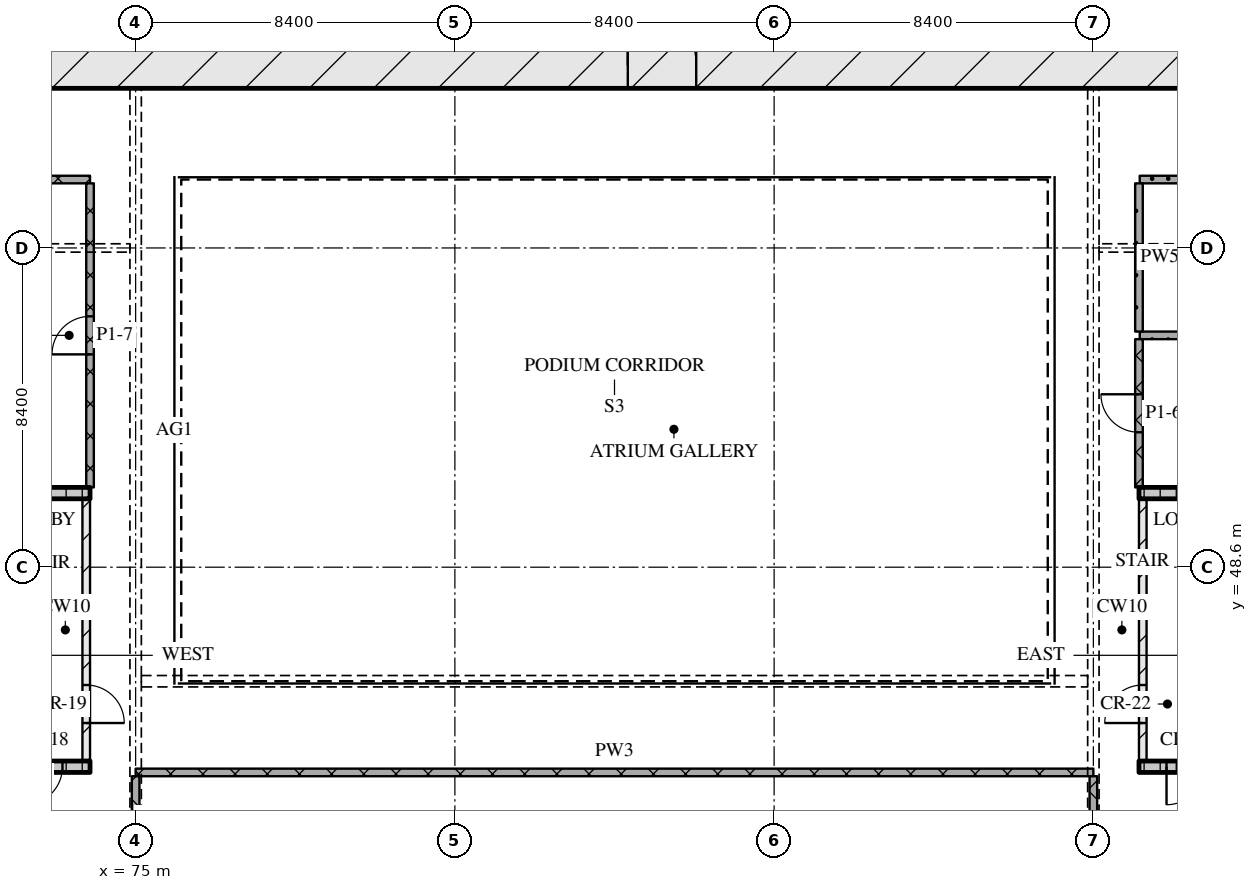
"""IFC4 building model, lengths in metres.
Left out: names, types, materials, properties, quantities, classifications, styles, units other than length and angle.
Written with IfcOpenShell. Run it as: python <this file> out.ifc"""

import sys

from ifc_helpers import new_model, si_unit, direction, frame, frame_2d, origin, place, context, subcontext, project, spatial, rectangle, extrude, element, fill, save


model = new_model("IFC4")
c1 = context("Model", 3, precision=1e-05, world=origin(), true_north=direction((0.0, 1.0)))
c2 = subcontext(c1, "Body", "Model", "MODEL_VIEW")
j1 = project(units=[si_unit("LENGTHUNIT", "METRE"), si_unit("PLANEANGLEUNIT", "RADIAN")], contexts=[c1])
p1 = place(None, origin())
s1 = spatial("IfcSite", under=j1, at=p1, CompositionType="ELEMENT")
p2 = place(p1, origin())
s2 = spatial("IfcBuilding", under=s1, at=p2, CompositionType="ELEMENT")
p3 = place(p2, frame((0.0, 0.0, 9.0)))
s3 = spatial("IfcBuildingStorey", under=s2, at=p3, CompositionType="ELEMENT", Elevation=9.0)
p4 = place(p3, frame((66.6, 61.8, 0.0), z_axis=(0.0, 0.0, 1.0), x_axis=(1.0, 0.0, 0.0)))
e1 = element("IfcWall", 1, at=p4, inside=s3, PredefinedType="SOLIDWALL", context=c2, shape_type="SweptSolid", body=[
    extrude(rectangle(XDim=42.0, YDim=1.2, at=frame_2d((21.0, 0.0))), origin(), (0.0, 0.0, 1.0), 5.1),
])
p5 = place(p4, frame((21.35, 0.0, 0.0)))
e2 = element("IfcOpeningElement", 2, at=p5, cuts=e1, PredefinedType="OPENING", context=c2, shape_type="SweptSolid", body=[
    extrude(rectangle(XDim=1.8, YDim=2.1, at=frame_2d((0.9, 1.05))), frame((0.0, 0.61, 0.0), z_axis=(0.0, -1.0, 0.0), x_axis=(1.0, 0.0, 0.0)), (0.0, 0.0, 1.0), 1.22),
])
p6 = place(p3, frame((68.2, 43.35, 0.0), z_axis=(0.0, 0.0, 1.0), x_axis=(1.0, 0.0, 0.0)))
e3 = element("IfcWall", 3, at=p6, inside=s3, PredefinedType="SOLIDWALL", context=c2, shape_type="SweptSolid", body=[
    extrude(rectangle(XDim=5.6, YDim=0.3, at=frame_2d((2.8, 0.0))), origin(), (0.0, 0.0, 1.0), 5.1),
])
p7 = place(p6, frame((3.875, 0.0, 0.0)))
e4 = element("IfcOpeningElement", 4, at=p7, cuts=e3, PredefinedType="OPENING", context=c2, shape_type="SweptSolid", body=[
    extrude(rectangle(XDim=1.0, YDim=2.1, at=frame_2d((0.5, 1.05))), frame((0.0, 0.16, 0.0), z_axis=(0.0, -1.0, 0.0), x_axis=(1.0, 0.0, 0.0)), (0.0, 0.0, 1.0), 0.32),
])
p8 = place(p3, frame((73.7, 43.5, 0.0), z_axis=(0.0, 0.0, 1.0), x_axis=(0.0, 1.0, 0.0)))
e5 = element("IfcWall", 5, at=p8, inside=s3, PredefinedType="PARTITIONING", context=c2, shape_type="SweptSolid", body=[
    extrude(rectangle(XDim=6.9, YDim=0.2, at=frame_2d((3.45, 0.0))), origin(), (0.0, 0.0, 1.0), 5.1),
])
p9 = place(p8, frame((1.0, 0.0, 0.0)))
e6 = element("IfcOpeningElement", 6, at=p9, cuts=e5, PredefinedType="OPENING", context=c2, shape_type="SweptSolid", body=[
    extrude(rectangle(XDim=1.0, YDim=2.1, at=frame_2d((0.5, 1.05))), frame((0.0, 0.11, 0.0), z_axis=(0.0, -1.0, 0.0), x_axis=(1.0, 0.0, 0.0)), (0.0, 0.0, 1.0), 0.22),
])
p10 = place(p3, frame((68.2, 50.55, 0.0), z_axis=(0.0, 0.0, 1.0), x_axis=(1.0, 0.0, 0.0)))
e7 = element("IfcWall", 7, at=p10, inside=s3, PredefinedType="SOLIDWALL", context=c2, shape_type="SweptSolid", body=[
    extrude(rectangle(XDim=5.6, YDim=0.3, at=frame_2d((2.8, 0.0))), origin(), (0.0, 0.0, 1.0), 5.1),
])
p11 = place(p3, frame((101.4, 43.35, 0.0), z_axis=(0.0, 0.0, 1.0), x_axis=(1.0, 0.0, 0.0)))
e8 = element("IfcWall", 8, at=p11, inside=s3, PredefinedType="SOLIDWALL", context=c2, shape_type="SweptSolid", body=[
    extrude(rectangle(XDim=5.6, YDim=0.3, at=frame_2d((2.8, 0.0))), origin(), (0.0, 0.0, 1.0), 5.1),
])
p12 = place(p11, frame((0.725, 0.0, 0.0)))
e9 = element("IfcOpeningElement", 9, at=p12, cuts=e8, PredefinedType="OPENING", context=c2, shape_type="SweptSolid", body=[
    extrude(rectangle(XDim=1.0, YDim=2.1, at=frame_2d((0.5, 1.05))), frame((0.0, 0.16, 0.0), z_axis=(0.0, -1.0, 0.0), x_axis=(1.0, 0.0, 0.0)), (0.0, 0.0, 1.0), 0.32),
])
p13 = place(p3, frame((101.5, 43.5, 0.0), z_axis=(0.0, 0.0, 1.0), x_axis=(0.0, 1.0, 0.0)))
e10 = element("IfcWall", 10, at=p13, inside=s3, PredefinedType="PARTITIONING", context=c2, shape_type="SweptSolid", body=[
    extrude(rectangle(XDim=6.9, YDim=0.2, at=frame_2d((3.45, 0.0))), origin(), (0.0, 0.0, 1.0), 5.1),
])
p14 = place(p13, frame((1.0, 0.0, 0.0)))
e11 = element("IfcOpeningElement", 11, at=p14, cuts=e10, PredefinedType="OPENING", context=c2, shape_type="SweptSolid", body=[
    extrude(rectangle(XDim=1.0, YDim=2.1, at=frame_2d((0.5, 1.05))), frame((0.0, 0.11, 0.0), z_axis=(0.0, -1.0, 0.0), x_axis=(1.0, 0.0, 0.0)), (0.0, 0.0, 1.0), 0.22),
])
p15 = place(p3, frame((101.4, 50.55, 0.0), z_axis=(0.0, 0.0, 1.0), x_axis=(1.0, 0.0, 0.0)))
e12 = element("IfcWall", 12, at=p15, inside=s3, PredefinedType="SOLIDWALL", context=c2, shape_type="SweptSolid", body=[
    extrude(rectangle(XDim=5.6, YDim=0.3, at=frame_2d((2.8, 0.0))), origin(), (0.0, 0.0, 1.0), 5.1),
])
p16 = place(p3, frame((75.0, 43.2, 0.0), z_axis=(0.0, 0.0, 1.0), x_axis=(1.0, 0.0, 0.0)))
e13 = element("IfcWall", 13, at=p16, inside=s3, PredefinedType="PARTITIONING", context=c2, shape_type="SweptSolid", body=[
    extrude(rectangle(XDim=25.2, YDim=0.2, at=frame_2d((12.6, 0.0))), origin(), (0.0, 0.0, 1.0), 5.1),
])
p17 = place(p3, frame((101.42, 54.7, 0.0), z_axis=(0.0, 0.0, 1.0), x_axis=(1.0, 0.0, 0.0)))
e14 = element("IfcWall", 14, at=p17, inside=s3, PredefinedType="PARTITIONING", context=c2, shape_type="SweptSolid", body=[
    extrude(rectangle(XDim=5.96, YDim=0.2, at=frame_2d((2.98, 0.0))), origin(), (0.0, 0.0, 1.0), 5.1),
])
p18 = place(p3, frame((73.8, 58.8, 0.0), z_axis=(0.0, 0.0, 1.0), x_axis=(-1.0, 0.0, 0.0)))
e15 = element("IfcWall", 15, at=p18, inside=s3, PredefinedType="PARTITIONING", context=c2, shape_type="SweptSolid", body=[
    extrude(rectangle(XDim=38.4, YDim=0.2, at=frame_2d((19.2, 0.0))), origin(), (0.0, 0.0, 1.0), 5.1),
])
p19 = place(p18, frame((21.6, 0.0, 0.0)))
e16 = element("IfcOpeningElement", 16, at=p19, cuts=e15, PredefinedType="OPENING", context=c2, shape_type="SweptSolid", body=[
    extrude(rectangle(XDim=1.2, YDim=2.1, at=frame_2d((0.6, 1.05))), frame((0.0, 0.11, 0.0), z_axis=(0.0, -1.0, 0.0), x_axis=(1.0, 0.0, 0.0)), (0.0, 0.0, 1.0), 0.22),
])
p20 = place(p3, frame((101.42, 58.8, 0.0), z_axis=(0.0, 0.0, 1.0), x_axis=(1.0, 0.0, 0.0)))
e17 = element("IfcWall", 17, at=p20, inside=s3, PredefinedType="PARTITIONING", context=c2, shape_type="SweptSolid", body=[
    extrude(rectangle(XDim=5.96, YDim=0.2, at=frame_2d((2.98, 0.0))), origin(), (0.0, 0.0, 1.0), 5.1),
])
p21 = place(p3, frame((73.8, 50.7, 0.0), z_axis=(0.0, 0.0, 1.0), x_axis=(0.0, 1.0, 0.0)))
e18 = element("IfcWall", 18, at=p21, inside=s3, PredefinedType="PARTITIONING", context=c2, shape_type="SweptSolid", body=[
    extrude(rectangle(XDim=8.0, YDim=0.2, at=frame_2d((4.0, 0.0))), origin(), (0.0, 0.0, 1.0), 5.1),
])
p22 = place(p21, frame((3.5, 0.0, 0.0)))
e19 = element("IfcOpeningElement", 19, at=p22, cuts=e18, PredefinedType="OPENING", context=c2, shape_type="SweptSolid", body=[
    extrude(rectangle(XDim=1.0, YDim=2.1, at=frame_2d((0.5, 1.05))), frame((0.0, 0.11, 0.0), z_axis=(0.0, -1.0, 0.0), x_axis=(1.0, 0.0, 0.0)), (0.0, 0.0, 1.0), 0.22),
])
for number, where, z_axis, x_axis in (
    (20, (75.0, 43.1, 0.0), (0.0, 0.0, 1.0), (0.0, -1.0, 0.0)),
    (21, (100.2, 43.1, 0.0), (0.0, 0.0, 1.0), (0.0, -1.0, 0.0)),
):
    element("IfcWall", number, at=place(p3, frame(where, z_axis=z_axis, x_axis=x_axis)), inside=s3, PredefinedType="PARTITIONING", context=c2, shape_type="SweptSolid", body=[
        extrude(rectangle(XDim=2.2, YDim=0.2, at=frame_2d((1.1, 0.0))), origin(), (0.0, 0.0, 1.0), 4.2),
    ])
p23 = place(p3, frame((101.4, 54.6, 0.0), z_axis=(0.0, 0.0, 1.0), x_axis=(0.0, -1.0, 0.0)))
e22 = element("IfcWall", 22, at=p23, inside=s3, PredefinedType="PARTITIONING", context=c2, shape_type="SweptSolid", body=[
    extrude(rectangle(XDim=3.9, YDim=0.2, at=frame_2d((1.95, 0.0))), origin(), (0.0, 0.0, 1.0), 5.1),
])
p24 = place(p23, frame((1.45, 0.0, 0.0)))
e23 = element("IfcOpeningElement", 23, at=p24, cuts=e22, PredefinedType="OPENING", context=c2, shape_type="SweptSolid", body=[
    extrude(rectangle(XDim=1.0, YDim=2.1, at=frame_2d((0.5, 1.05))), frame((0.0, 0.11, 0.0), z_axis=(0.0, -1.0, 0.0), x_axis=(1.0, 0.0, 0.0)), (0.0, 0.0, 1.0), 0.22),
])
p25 = place(p3, frame((101.4, 58.7, 0.0), z_axis=(0.0, 0.0, 1.0), x_axis=(0.0, -1.0, 0.0)))
e24 = element("IfcWall", 24, at=p25, inside=s3, PredefinedType="PARTITIONING", context=c2, shape_type="SweptSolid", body=[
    extrude(rectangle(XDim=3.9, YDim=0.2, at=frame_2d((1.95, 0.0))), origin(), (0.0, 0.0, 1.0), 5.1),
])
p26 = place(p5, origin())
e25 = element("IfcDoor", 25, at=p26, inside=s3, OperationType="DOUBLE_DOOR_SINGLE_SWING", PredefinedType="DOOR", context=c2, shape_type="SweptSolid", body=[
    extrude(rectangle(XDim=1.8, YDim=2.1, at=frame_2d((0.9, 1.05))), frame((0.0, 0.025, 0.0), z_axis=(0.0, -1.0, 0.0), x_axis=(1.0, 0.0, 0.0)), (0.0, 0.0, 1.0), 0.05),
])
fill(e2, e25)
p27 = place(p7, origin())
e26 = element("IfcDoor", 26, at=p27, inside=s3, OperationType="SINGLE_SWING_RIGHT", PredefinedType="DOOR", context=c2, shape_type="SweptSolid", body=[
    extrude(rectangle(XDim=1.0, YDim=2.1, at=frame_2d((0.5, 1.05))), frame((0.0, 0.025, 0.0), z_axis=(0.0, -1.0, 0.0), x_axis=(1.0, 0.0, 0.0)), (0.0, 0.0, 1.0), 0.05),
])
fill(e4, e26)
p28 = place(p9, origin())
e27 = element("IfcDoor", 27, at=p28, inside=s3, OperationType="SINGLE_SWING_RIGHT", PredefinedType="DOOR", context=c2, shape_type="SweptSolid", body=[
    extrude(rectangle(XDim=1.0, YDim=2.1, at=frame_2d((0.5, 1.05))), frame((0.0, 0.025, 0.0), z_axis=(0.0, -1.0, 0.0), x_axis=(1.0, 0.0, 0.0)), (0.0, 0.0, 1.0), 0.05),
])
fill(e6, e27)
p29 = place(p12, origin())
e28 = element("IfcDoor", 28, at=p29, inside=s3, OperationType="SINGLE_SWING_RIGHT", PredefinedType="DOOR", context=c2, shape_type="SweptSolid", body=[
    extrude(rectangle(XDim=1.0, YDim=2.1, at=frame_2d((0.5, 1.05))), frame((0.0, 0.025, 0.0), z_axis=(0.0, -1.0, 0.0), x_axis=(1.0, 0.0, 0.0)), (0.0, 0.0, 1.0), 0.05),
])
fill(e9, e28)
p30 = place(p14, origin())
e29 = element("IfcDoor", 29, at=p30, inside=s3, OperationType="SINGLE_SWING_LEFT", PredefinedType="DOOR", context=c2, shape_type="SweptSolid", body=[
    extrude(rectangle(XDim=1.0, YDim=2.1, at=frame_2d((0.5, 1.05))), frame((0.0, 0.025, 0.0), z_axis=(0.0, -1.0, 0.0), x_axis=(1.0, 0.0, 0.0)), (0.0, 0.0, 1.0), 0.05),
])
fill(e11, e29)
p31 = place(p22, origin())
e30 = element("IfcDoor", 30, at=p31, inside=s3, OperationType="SINGLE_SWING_LEFT", PredefinedType="DOOR", context=c2, shape_type="SweptSolid", body=[
    extrude(rectangle(XDim=1.0, YDim=2.1, at=frame_2d((0.5, 1.05))), frame((0.0, 0.025, 0.0), z_axis=(0.0, -1.0, 0.0), x_axis=(1.0, 0.0, 0.0)), (0.0, 0.0, 1.0), 0.05),
])
fill(e19, e30)
p32 = place(p24, origin())
e31 = element("IfcDoor", 31, at=p32, inside=s3, OperationType="SINGLE_SWING_RIGHT", PredefinedType="DOOR", context=c2, shape_type="SweptSolid", body=[
    extrude(rectangle(XDim=1.0, YDim=2.1, at=frame_2d((0.5, 1.05))), frame((0.0, 0.025, 0.0), z_axis=(0.0, -1.0, 0.0), x_axis=(1.0, 0.0, 0.0)), (0.0, 0.0, 1.0), 0.05),
])
fill(e23, e31)
save(model, sys.argv[1])
